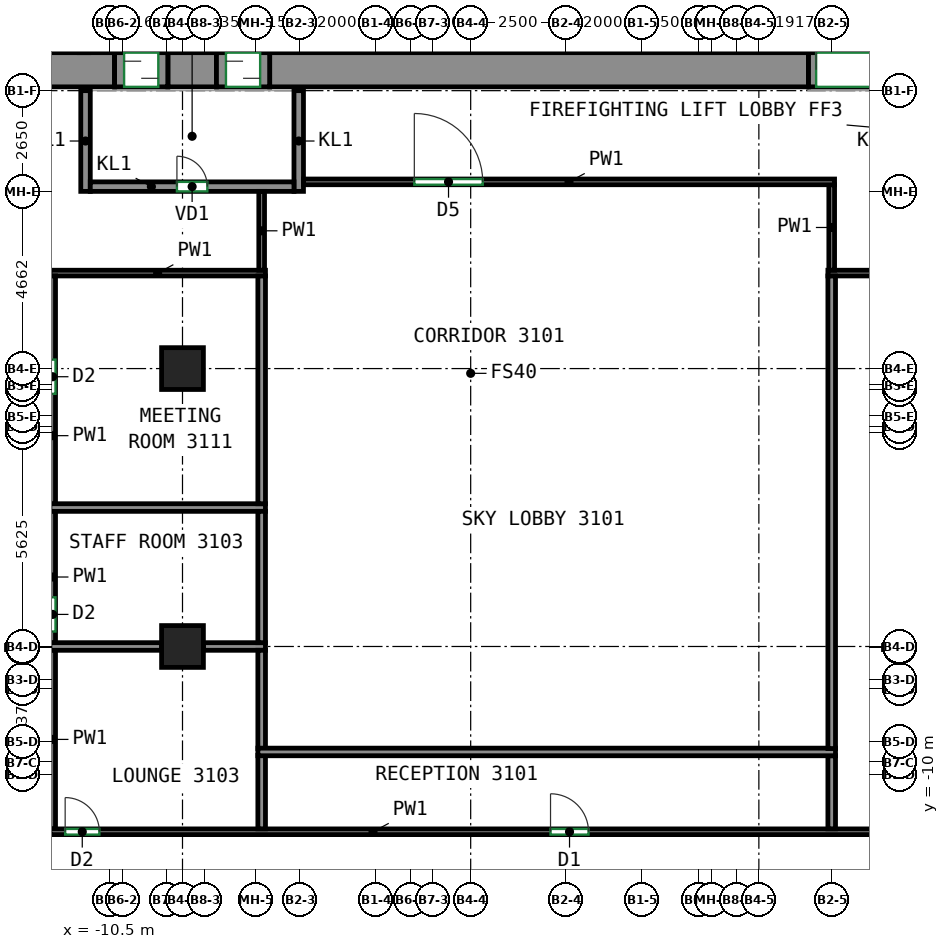
"""IFC4 building model, lengths in metres.
Left out: names, types, materials, properties, quantities, classifications, styles, units other than length and angle.
Written with IfcOpenShell. Run it as: python <this file> out.ifc"""

import sys

from ifc_helpers import new_model, si_unit, direction, frame, frame_2d, origin, origin_2d, place, context, subcontext, project, spatial, rectangle, extrude, source, transform, mapped, element, fill, save


model = new_model("IFC4")
c1 = context("Model", 3, precision=1e-05, world=origin(), true_north=direction((0.0, 1.0)))
c2 = subcontext(c1, "Body", "Model", "MODEL_VIEW")
j1 = project(units=[si_unit("LENGTHUNIT", "METRE"), si_unit("PLANEANGLEUNIT", "RADIAN")], contexts=[c1])
p1 = place(None, origin())
s1 = spatial("IfcSite", under=j1, at=p1, CompositionType="ELEMENT")
p2 = place(p1, origin())
s2 = spatial("IfcBuilding", under=s1, at=p2, CompositionType="ELEMENT")
p3 = place(p2, frame((0.0, 0.0, 138.5)))
s3 = spatial("IfcBuildingStorey", under=s2, at=p3, CompositionType="ELEMENT", Elevation=138.5)
m1 = source(origin(), c2, "Body", "SweptSolid", [
    extrude(rectangle(XDim=1.1, YDim=1.1, at=origin_2d()), origin(), (0.0, 0.0, 1.0), 5.12),
])
for number, where, z_axis, x_axis in (
    (1, (-8.583, -6.625, 0.0), (0.0, 0.0, 1.0), (1.0, 0.0, 0.0)),
    (2, (-8.583, 0.688, 0.0), (0.0, 0.0, 1.0), (1.0, 0.0, 0.0)),
):
    element("IfcColumn", number, at=place(p3, frame(where, z_axis=z_axis, x_axis=x_axis)), inside=s3, PredefinedType="COLUMN", context=c2, shape_type="MappedRepresentation", body=[
        mapped(m1, transform((0.0, 0.0, 0.0))),
    ])
m2 = source(origin(), c2, "Body", "SweptSolid", [
    extrude(rectangle(XDim=5.53, YDim=0.9, at=frame_2d((2.765, 0.0))), origin(), (0.0, 0.0, 1.0), 5.12),
])
p4 = place(p3, frame((-15.9, 8.55, 0.0), z_axis=(0.0, 0.0, 1.0), x_axis=(1.0, 0.0, 0.0)))
e3 = element("IfcWall", 3, at=p4, inside=s3, PredefinedType="SHEAR", context=c2, shape_type="MappedRepresentation", body=[
    mapped(m2, transform((0.0, 0.0, 0.0))),
])
p5 = place(p4, frame((2.15, 0.0, 0.0)))
e4 = element("IfcOpeningElement", 4, at=p5, cuts=e3, PredefinedType="OPENING", context=c2, shape_type="SweptSolid", body=[
    extrude(rectangle(XDim=1.2, YDim=2.1, at=frame_2d((0.6, 1.05))), frame((0.0, 0.46, 0.0), z_axis=(0.0, -1.0, 0.0), x_axis=(1.0, 0.0, 0.0)), (0.0, 0.0, 1.0), 0.92),
])
m3 = source(origin(), c2, "Body", "SweptSolid", [
    extrude(rectangle(XDim=1.28, YDim=0.9, at=frame_2d((0.64, 0.0))), origin(), (0.0, 0.0, 1.0), 5.12),
])
p6 = place(p3, frame((-8.97, 8.55, 0.0), z_axis=(0.0, 0.0, 1.0), x_axis=(1.0, 0.0, 0.0)))
e5 = element("IfcWall", 5, at=p6, inside=s3, PredefinedType="SHEAR", context=c2, shape_type="MappedRepresentation", body=[
    mapped(m3, transform((0.0, 0.0, 0.0))),
])
m4 = source(origin(), c2, "Body", "SweptSolid", [
    extrude(rectangle(XDim=14.18, YDim=0.9, at=frame_2d((7.09, 0.0))), origin(), (0.0, 0.0, 1.0), 5.12),
])
p7 = place(p3, frame((-6.29, 8.55, 0.0), z_axis=(0.0, 0.0, 1.0), x_axis=(1.0, 0.0, 0.0)))
e6 = element("IfcWall", 6, at=p7, inside=s3, PredefinedType="SHEAR", context=c2, shape_type="MappedRepresentation", body=[
    mapped(m4, transform((0.0, 0.0, 0.0))),
])
m5 = source(origin(), c2, "Body", "SweptSolid", [
    extrude(rectangle(XDim=1.4, YDim=0.9, at=frame_2d((0.7, 0.0))), origin(), (0.0, 0.0, 1.0), 1.22),
])
p8 = place(p3, frame((-10.37, 8.55, 3.9), z_axis=(0.0, 0.0, 1.0), x_axis=(1.0, 0.0, 0.0)))
e7 = element("IfcWall", 7, at=p8, inside=s3, PredefinedType="SHEAR", context=c2, shape_type="MappedRepresentation", body=[
    mapped(m5, transform((0.0, 0.0, 0.0))),
])
m6 = source(origin(), c2, "Body", "SweptSolid", [
    extrude(rectangle(XDim=1.4, YDim=0.9, at=frame_2d((0.7, 0.0))), origin(), (0.0, 0.0, 1.0), 1.17),
])
p9 = place(p3, frame((-7.69, 8.55, 3.95), z_axis=(0.0, 0.0, 1.0), x_axis=(1.0, 0.0, 0.0)))
e8 = element("IfcWall", 8, at=p9, inside=s3, PredefinedType="SHEAR", context=c2, shape_type="MappedRepresentation", body=[
    mapped(m6, transform((0.0, 0.0, 0.0))),
])
m7 = source(origin(), c2, "Body", "SweptSolid", [
    extrude(rectangle(XDim=2.4, YDim=0.9, at=frame_2d((1.2, 0.0))), origin(), (0.0, 0.0, 1.0), 0.92),
])
p10 = place(p3, frame((7.89, 8.55, 4.2), z_axis=(0.0, 0.0, 1.0), x_axis=(1.0, 0.0, 0.0)))
e9 = element("IfcWall", 9, at=p10, inside=s3, PredefinedType="SHEAR", context=c2, shape_type="MappedRepresentation", body=[
    mapped(m7, transform((0.0, 0.0, 0.0))),
])
m8 = source(origin(), c2, "Body", "SweptSolid", [
    extrude(rectangle(XDim=2.65, YDim=0.25, at=frame_2d((1.325, 0.0))), origin(), (0.0, 0.0, 1.0), 5.12),
])
for number, where, z_axis, x_axis in (
    (10, (-11.135, 5.35, 0.0), (0.0, 0.0, 1.0), (0.0, 1.0, 0.0)),
    (11, (-5.525, 5.35, 0.0), (0.0, 0.0, 1.0), (0.0, 1.0, 0.0)),
):
    element("IfcWall", number, at=place(p3, frame(where, z_axis=z_axis, x_axis=x_axis)), inside=s3, PredefinedType="PARTITIONING", context=c2, shape_type="MappedRepresentation", body=[
        mapped(m8, transform((0.0, 0.0, 0.0))),
    ])
m9 = source(origin(), c2, "Body", "SweptSolid", [
    extrude(rectangle(XDim=5.36, YDim=0.25, at=frame_2d((2.68, 0.0))), origin(), (0.0, 0.0, 1.0), 5.12),
])
p11 = place(p3, frame((-11.01, 5.475, 0.0), z_axis=(0.0, 0.0, 1.0), x_axis=(1.0, 0.0, 0.0)))
e12 = element("IfcWall", 12, at=p11, inside=s3, PredefinedType="PARTITIONING", context=c2, shape_type="MappedRepresentation", body=[
    mapped(m9, transform((0.0, 0.0, 0.0))),
])
p12 = place(p11, frame((2.28, 0.0, 0.0)))
e13 = element("IfcOpeningElement", 13, at=p12, cuts=e12, PredefinedType="OPENING", context=c2, shape_type="SweptSolid", body=[
    extrude(rectangle(XDim=0.8, YDim=2.0, at=frame_2d((0.4, 1.0))), frame((0.0, 0.135, 0.0), z_axis=(0.0, -1.0, 0.0), x_axis=(1.0, 0.0, 0.0)), (0.0, 0.0, 1.0), 0.27),
])
m10 = source(origin(), c2, "Body", "SweptSolid", [
    extrude(rectangle(XDim=1.4, YDim=0.9, at=frame_2d((0.7, 0.0))), origin(), (0.0, 0.0, 1.0), 2.7),
])
p13 = place(p3, frame((-10.37, 8.55, 0.0), z_axis=(0.0, 0.0, 1.0), x_axis=(1.0, 0.0, 0.0)))
e14 = element("IfcWall", 14, at=p13, inside=s3, PredefinedType="PARTITIONING", context=c2, shape_type="MappedRepresentation", body=[
    mapped(m10, transform((0.0, 0.0, 0.0))),
])
p14 = place(p13, frame((0.25, 0.0, 0.0)))
e15 = element("IfcOpeningElement", 15, at=p14, cuts=e14, PredefinedType="OPENING", context=c2, shape_type="SweptSolid", body=[
    extrude(rectangle(XDim=0.9, YDim=2.1, at=frame_2d((0.45, 1.05))), frame((0.0, 0.46, 0.0), z_axis=(0.0, -1.0, 0.0), x_axis=(1.0, 0.0, 0.0)), (0.0, 0.0, 1.0), 0.92),
])
m11 = source(origin(), c2, "Body", "SweptSolid", [
    extrude(rectangle(XDim=1.4, YDim=0.9, at=frame_2d((0.7, 0.0))), origin(), (0.0, 0.0, 1.0), 2.7),
])
p15 = place(p3, frame((-7.69, 8.55, 0.0), z_axis=(0.0, 0.0, 1.0), x_axis=(1.0, 0.0, 0.0)))
e16 = element("IfcWall", 16, at=p15, inside=s3, PredefinedType="PARTITIONING", context=c2, shape_type="MappedRepresentation", body=[
    mapped(m11, transform((0.0, 0.0, 0.0))),
])
p16 = place(p15, frame((0.25, 0.0, 0.0)))
e17 = element("IfcOpeningElement", 17, at=p16, cuts=e16, PredefinedType="OPENING", context=c2, shape_type="SweptSolid", body=[
    extrude(rectangle(XDim=0.9, YDim=2.1, at=frame_2d((0.45, 1.05))), frame((0.0, 0.46, 0.0), z_axis=(0.0, -1.0, 0.0), x_axis=(1.0, 0.0, 0.0)), (0.0, 0.0, 1.0), 0.92),
])
m12 = source(origin(), c2, "Body", "SweptSolid", [
    extrude(rectangle(XDim=2.4, YDim=0.9, at=frame_2d((1.2, 0.0))), origin(), (0.0, 0.0, 1.0), 2.7),
])
p17 = place(p3, frame((7.89, 8.55, 0.0), z_axis=(0.0, 0.0, 1.0), x_axis=(1.0, 0.0, 0.0)))
e18 = element("IfcWall", 18, at=p17, inside=s3, PredefinedType="PARTITIONING", context=c2, shape_type="MappedRepresentation", body=[
    mapped(m12, transform((0.0, 0.0, 0.0))),
])
p18 = place(p17, frame((0.2, 0.0, 0.0)))
e19 = element("IfcOpeningElement", 19, at=p18, cuts=e18, PredefinedType="OPENING", context=c2, shape_type="SweptSolid", body=[
    extrude(rectangle(XDim=2.0, YDim=2.1, at=frame_2d((1.0, 1.05))), frame((0.0, 0.46, 0.0), z_axis=(0.0, -1.0, 0.0), x_axis=(1.0, 0.0, 0.0)), (0.0, 0.0, 1.0), 0.92),
])
p19 = place(p3, frame((-12.0, -11.425, 0.0), z_axis=(0.0, 0.0, 1.0), x_axis=(0.0, 1.0, 0.0)))
e20 = element("IfcWall", 20, at=p19, inside=s3, PredefinedType="PARTITIONING", context=c2, shape_type="SweptSolid", body=[
    extrude(rectangle(XDim=4.71, YDim=0.15, at=frame_2d((2.355, 0.0))), origin(), (0.0, 0.0, 1.0), 5.12),
])
p20 = place(p3, frame((-12.075, -11.5, 0.0), z_axis=(0.0, 0.0, 1.0), x_axis=(1.0, 0.0, 0.0)))
e21 = element("IfcWall", 21, at=p20, inside=s3, PredefinedType="PARTITIONING", context=c2, shape_type="SweptSolid", body=[
    extrude(rectangle(XDim=28.35, YDim=0.15, at=frame_2d((14.175, 0.0))), origin(), (0.0, 0.0, 1.0), 5.12),
])
p21 = place(p20, frame((0.404, 0.0, 0.0)))
e22 = element("IfcOpeningElement", 22, at=p21, cuts=e21, PredefinedType="OPENING", context=c2, shape_type="SweptSolid", body=[
    extrude(rectangle(XDim=0.9, YDim=2.1, at=frame_2d((0.45, 1.05))), frame((0.0, 0.085, 0.0), z_axis=(0.0, -1.0, 0.0), x_axis=(1.0, 0.0, 0.0)), (0.0, 0.0, 1.0), 0.17),
])
p22 = place(p20, frame((13.176, 0.0, 0.0)))
e23 = element("IfcOpeningElement", 23, at=p22, cuts=e21, PredefinedType="OPENING", context=c2, shape_type="SweptSolid", body=[
    extrude(rectangle(XDim=1.0, YDim=2.1, at=frame_2d((0.5, 1.05))), frame((0.0, 0.085, 0.0), z_axis=(0.0, -1.0, 0.0), x_axis=(1.0, 0.0, 0.0)), (0.0, 0.0, 1.0), 0.17),
])
p23 = place(p3, frame((-12.0, -6.535, 0.0), z_axis=(0.0, 0.0, 1.0), x_axis=(0.0, 1.0, 0.0)))
e24 = element("IfcWall", 24, at=p23, inside=s3, PredefinedType="PARTITIONING", context=c2, shape_type="SweptSolid", body=[
    extrude(rectangle(XDim=3.476, YDim=0.15, at=frame_2d((1.738, 0.0))), origin(), (0.0, 0.0, 1.0), 5.12),
])
p24 = place(p23, frame((0.304, 0.0, 0.0)))
e25 = element("IfcOpeningElement", 25, at=p24, cuts=e24, PredefinedType="OPENING", context=c2, shape_type="SweptSolid", body=[
    extrude(rectangle(XDim=0.9, YDim=2.1, at=frame_2d((0.45, 1.05))), frame((0.0, 0.085, 0.0), z_axis=(0.0, -1.0, 0.0), x_axis=(1.0, 0.0, 0.0)), (0.0, 0.0, 1.0), 0.17),
])
p25 = place(p3, frame((-12.075, 3.2, 0.0), z_axis=(0.0, 0.0, 1.0), x_axis=(1.0, 0.0, 0.0)))
e26 = element("IfcWall", 26, at=p25, inside=s3, PredefinedType="PARTITIONING", context=c2, shape_type="SweptSolid", body=[
    extrude(rectangle(XDim=5.675, YDim=0.15, at=frame_2d((2.837, 0.0))), origin(), (0.0, 0.0, 1.0), 5.12),
])
p26 = place(p3, frame((-12.0, -2.879, 0.0), z_axis=(0.0, 0.0, 1.0), x_axis=(0.0, 1.0, 0.0)))
e27 = element("IfcWall", 27, at=p26, inside=s3, PredefinedType="PARTITIONING", context=c2, shape_type="SweptSolid", body=[
    extrude(rectangle(XDim=6.004, YDim=0.15, at=frame_2d((3.002, 0.0))), origin(), (0.0, 0.0, 1.0), 5.12),
])
p27 = place(p26, frame((2.902, 0.0, 0.0)))
e28 = element("IfcOpeningElement", 28, at=p27, cuts=e27, PredefinedType="OPENING", context=c2, shape_type="SweptSolid", body=[
    extrude(rectangle(XDim=0.9, YDim=2.1, at=frame_2d((0.45, 1.05))), frame((0.0, 0.085, 0.0), z_axis=(0.0, -1.0, 0.0), x_axis=(1.0, 0.0, 0.0)), (0.0, 0.0, 1.0), 0.17),
])
p28 = place(p3, frame((8.4, 3.2, 0.0), z_axis=(0.0, 0.0, 1.0), x_axis=(1.0, 0.0, 0.0)))
e29 = element("IfcWall", 29, at=p28, inside=s3, PredefinedType="PARTITIONING", context=c2, shape_type="SweptSolid", body=[
    extrude(rectangle(XDim=7.875, YDim=0.15, at=frame_2d((3.938, 0.0))), origin(), (0.0, 0.0, 1.0), 5.12),
])
p29 = place(p3, frame((-6.5, 3.275, 0.0), z_axis=(0.0, 0.0, 1.0), x_axis=(0.0, 1.0, 0.0)))
e30 = element("IfcWall", 30, at=p29, inside=s3, PredefinedType="PARTITIONING", context=c2, shape_type="SweptSolid", body=[
    extrude(rectangle(XDim=2.075, YDim=0.15, at=frame_2d((1.038, 0.0))), origin(), (0.0, 0.0, 1.0), 5.12),
])
p30 = place(p3, frame((8.5, 5.525, 0.0), z_axis=(0.0, 0.0, 1.0), x_axis=(0.0, -1.0, 0.0)))
e31 = element("IfcWall", 31, at=p30, inside=s3, PredefinedType="PARTITIONING", context=c2, shape_type="SweptSolid", body=[
    extrude(rectangle(XDim=2.25, YDim=0.15, at=frame_2d((1.125, 0.0))), origin(), (0.0, 0.0, 1.0), 5.12),
])
p31 = place(p3, frame((-5.4, 5.6, 0.0), z_axis=(0.0, 0.0, 1.0), x_axis=(1.0, 0.0, 0.0)))
e32 = element("IfcWall", 32, at=p31, inside=s3, PredefinedType="PARTITIONING", context=c2, shape_type="SweptSolid", body=[
    extrude(rectangle(XDim=13.975, YDim=0.15, at=frame_2d((6.987, 0.0))), origin(), (0.0, 0.0, 1.0), 5.12),
])
p32 = place(p31, frame((2.917, 0.0, 0.0)))
e33 = element("IfcOpeningElement", 33, at=p32, cuts=e32, PredefinedType="OPENING", context=c2, shape_type="SweptSolid", body=[
    extrude(rectangle(XDim=1.8, YDim=2.1, at=frame_2d((0.9, 1.05))), frame((0.0, 0.085, 0.0), z_axis=(0.0, -1.0, 0.0), x_axis=(1.0, 0.0, 0.0)), (0.0, 0.0, 1.0), 0.17),
])
p33 = place(p3, frame((-12.073, -6.625, 0.0), z_axis=(0.0, 0.0, 1.0), x_axis=(1.0, 0.0, 0.0)))
e34 = element("IfcWall", 34, at=p33, inside=s3, PredefinedType="PARTITIONING", context=c2, shape_type="SweptSolid", body=[
    extrude(rectangle(XDim=2.94, YDim=0.2, at=frame_2d((1.47, 0.0))), origin(), (0.0, 0.0, 1.0), 5.12),
])
p34 = place(p3, frame((-8.033, -6.625, 0.0), z_axis=(0.0, 0.0, 1.0), x_axis=(1.0, 0.0, 0.0)))
e35 = element("IfcWall", 35, at=p34, inside=s3, PredefinedType="PARTITIONING", context=c2, shape_type="SweptSolid", body=[
    extrude(rectangle(XDim=1.633, YDim=0.2, at=frame_2d((0.816, 0.0))), origin(), (0.0, 0.0, 1.0), 5.12),
])
p35 = place(p3, frame((-6.5, -11.423, 0.0), z_axis=(0.0, 0.0, 1.0), x_axis=(0.0, 1.0, 0.0)))
e36 = element("IfcWall", 36, at=p35, inside=s3, PredefinedType="PARTITIONING", context=c2, shape_type="SweptSolid", body=[
    extrude(rectangle(XDim=1.933, YDim=0.2, at=frame_2d((0.967, 0.0))), origin(), (0.0, 0.0, 1.0), 5.12),
])
p36 = place(p3, frame((-6.5, -9.31, 0.0), z_axis=(0.0, 0.0, 1.0), x_axis=(0.0, 1.0, 0.0)))
e37 = element("IfcWall", 37, at=p36, inside=s3, PredefinedType="PARTITIONING", context=c2, shape_type="SweptSolid", body=[
    extrude(rectangle(XDim=2.585, YDim=0.2, at=frame_2d((1.292, 0.0))), origin(), (0.0, 0.0, 1.0), 5.12),
])
p37 = place(p3, frame((-12.073, -2.969, 0.0), z_axis=(0.0, 0.0, 1.0), x_axis=(1.0, 0.0, 0.0)))
e38 = element("IfcWall", 38, at=p37, inside=s3, PredefinedType="PARTITIONING", context=c2, shape_type="SweptSolid", body=[
    extrude(rectangle(XDim=5.673, YDim=0.2, at=frame_2d((2.836, 0.0))), origin(), (0.0, 0.0, 1.0), 5.12),
])
p38 = place(p3, frame((-6.5, -6.525, 0.0), z_axis=(0.0, 0.0, 1.0), x_axis=(0.0, 1.0, 0.0)))
e39 = element("IfcWall", 39, at=p38, inside=s3, PredefinedType="PARTITIONING", context=c2, shape_type="SweptSolid", body=[
    extrude(rectangle(XDim=3.456, YDim=0.2, at=frame_2d((1.728, 0.0))), origin(), (0.0, 0.0, 1.0), 5.12),
])
p39 = place(p3, frame((-6.5, -2.869, 0.0), z_axis=(0.0, 0.0, 1.0), x_axis=(0.0, 1.0, 0.0)))
e40 = element("IfcWall", 40, at=p39, inside=s3, PredefinedType="PARTITIONING", context=c2, shape_type="SweptSolid", body=[
    extrude(rectangle(XDim=5.992, YDim=0.2, at=frame_2d((2.996, 0.0))), origin(), (0.0, 0.0, 1.0), 5.12),
])
p40 = place(p3, frame((8.5, -11.423, 0.0), z_axis=(0.0, 0.0, 1.0), x_axis=(0.0, 1.0, 0.0)))
e41 = element("IfcWall", 41, at=p40, inside=s3, PredefinedType="PARTITIONING", context=c2, shape_type="SweptSolid", body=[
    extrude(rectangle(XDim=1.923, YDim=0.2, at=frame_2d((0.961, 0.0))), origin(), (0.0, 0.0, 1.0), 5.12),
])
p41 = place(p3, frame((8.6, -9.4, 0.0), z_axis=(0.0, 0.0, 1.0), x_axis=(-1.0, 0.0, 0.0)))
e42 = element("IfcWall", 42, at=p41, inside=s3, PredefinedType="PARTITIONING", context=c2, shape_type="SweptSolid", body=[
    extrude(rectangle(XDim=15.2, YDim=0.2, at=frame_2d((7.6, 0.0))), origin(), (0.0, 0.0, 1.0), 5.12),
])
p42 = place(p3, frame((8.5, -9.31, 0.0), z_axis=(0.0, 0.0, 1.0), x_axis=(0.0, 1.0, 0.0)))
e43 = element("IfcWall", 43, at=p42, inside=s3, PredefinedType="PARTITIONING", context=c2, shape_type="SweptSolid", body=[
    extrude(rectangle(XDim=12.433, YDim=0.2, at=frame_2d((6.217, 0.0))), origin(), (0.0, 0.0, 1.0), 5.12),
])
p43 = place(p18, origin())
e44 = element("IfcDoor", 44, at=p43, inside=s3, OperationType="DOUBLE_DOOR_SINGLE_SWING", PredefinedType="DOOR", context=c2, shape_type="SweptSolid", body=[
    extrude(rectangle(XDim=2.0, YDim=2.1, at=frame_2d((1.0, 1.05))), frame((0.0, 0.355, 0.0), z_axis=(0.0, -1.0, 0.0), x_axis=(1.0, 0.0, 0.0)), (0.0, 0.0, 1.0), 0.05),
])
fill(e19, e44)
p44 = place(p12, origin())
e45 = element("IfcDoor", 45, at=p44, inside=s3, OperationType="SINGLE_SWING_LEFT", PredefinedType="DOOR", context=c2, shape_type="SweptSolid", body=[
    extrude(rectangle(XDim=0.8, YDim=2.0, at=frame_2d((0.4, 1.0))), frame((0.0, 0.025, 0.0), z_axis=(0.0, -1.0, 0.0), x_axis=(1.0, 0.0, 0.0)), (0.0, 0.0, 1.0), 0.05),
])
fill(e13, e45)
p45 = place(p14, origin())
e46 = element("IfcDoor", 46, at=p45, inside=s3, OperationType="SLIDING_TO_LEFT", PredefinedType="DOOR", context=c2, shape_type="SweptSolid", body=[
    extrude(rectangle(XDim=0.9, YDim=2.1, at=frame_2d((0.45, 1.05))), frame((0.0, 0.355, 0.0), z_axis=(0.0, -1.0, 0.0), x_axis=(1.0, 0.0, 0.0)), (0.0, 0.0, 1.0), 0.05),
])
fill(e15, e46)
p46 = place(p16, origin())
e47 = element("IfcDoor", 47, at=p46, inside=s3, OperationType="SLIDING_TO_RIGHT", PredefinedType="DOOR", context=c2, shape_type="SweptSolid", body=[
    extrude(rectangle(XDim=0.9, YDim=2.1, at=frame_2d((0.45, 1.05))), frame((0.0, 0.355, 0.0), z_axis=(0.0, -1.0, 0.0), x_axis=(1.0, 0.0, 0.0)), (0.0, 0.0, 1.0), 0.05),
])
fill(e17, e47)
p47 = place(p21, origin())
e48 = element("IfcDoor", 48, at=p47, inside=s3, OperationType="SINGLE_SWING_LEFT", PredefinedType="DOOR", context=c2, shape_type="SweptSolid", body=[
    extrude(rectangle(XDim=0.9, YDim=2.1, at=frame_2d((0.45, 1.05))), frame((0.0, 0.025, 0.0), z_axis=(0.0, -1.0, 0.0), x_axis=(1.0, 0.0, 0.0)), (0.0, 0.0, 1.0), 0.05),
])
fill(e22, e48)
p48 = place(p22, origin())
e49 = element("IfcDoor", 49, at=p48, inside=s3, OperationType="SINGLE_SWING_LEFT", PredefinedType="DOOR", context=c2, shape_type="SweptSolid", body=[
    extrude(rectangle(XDim=1.0, YDim=2.1, at=frame_2d((0.5, 1.05))), frame((0.0, 0.025, 0.0), z_axis=(0.0, -1.0, 0.0), x_axis=(1.0, 0.0, 0.0)), (0.0, 0.0, 1.0), 0.05),
])
fill(e23, e49)
p49 = place(p24, origin())
e50 = element("IfcDoor", 50, at=p49, inside=s3, OperationType="SINGLE_SWING_RIGHT", PredefinedType="DOOR", context=c2, shape_type="SweptSolid", body=[
    extrude(rectangle(XDim=0.9, YDim=2.1, at=frame_2d((0.45, 1.05))), frame((0.0, 0.025, 0.0), z_axis=(0.0, -1.0, 0.0), x_axis=(1.0, 0.0, 0.0)), (0.0, 0.0, 1.0), 0.05),
])
fill(e25, e50)
p50 = place(p27, origin())
e51 = element("IfcDoor", 51, at=p50, inside=s3, OperationType="SINGLE_SWING_RIGHT", PredefinedType="DOOR", context=c2, shape_type="SweptSolid", body=[
    extrude(rectangle(XDim=0.9, YDim=2.1, at=frame_2d((0.45, 1.05))), frame((0.0, 0.025, 0.0), z_axis=(0.0, -1.0, 0.0), x_axis=(1.0, 0.0, 0.0)), (0.0, 0.0, 1.0), 0.05),
])
fill(e28, e51)
p51 = place(p32, origin())
e52 = element("IfcDoor", 52, at=p51, inside=s3, OperationType="DOUBLE_DOOR_SINGLE_SWING", PredefinedType="DOOR", context=c2, shape_type="SweptSolid", body=[
    extrude(rectangle(XDim=1.8, YDim=2.1, at=frame_2d((0.9, 1.05))), frame((0.0, 0.025, 0.0), z_axis=(0.0, -1.0, 0.0), x_axis=(1.0, 0.0, 0.0)), (0.0, 0.0, 1.0), 0.05),
])
fill(e33, e52)
save(model, sys.argv[1])
